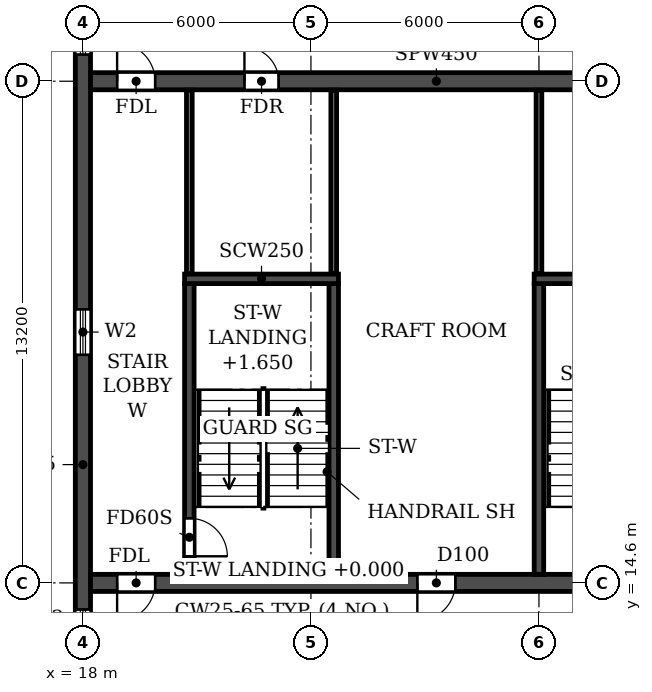
"""IFC4 building model, lengths in metres.
Left out: names, types, materials, properties, quantities, classifications, styles, units other than length and angle.
Written with IfcOpenShell. Run it as: python <this file> out.ifc"""

import sys

from ifc_helpers import new_model, si_unit, direction, frame, frame_2d, origin, place, context, subcontext, project, spatial, rectangle, extrude, element, fill, save


model = new_model("IFC4")
c1 = context("Model", 3, precision=1e-05, world=origin(), true_north=direction((0.0, 1.0)))
c2 = subcontext(c1, "Body", "Model", "MODEL_VIEW")
j1 = project(units=[si_unit("LENGTHUNIT", "METRE"), si_unit("PLANEANGLEUNIT", "RADIAN")], contexts=[c1])
p1 = place(None, origin())
s1 = spatial("IfcSite", under=j1, at=p1, CompositionType="ELEMENT")
p2 = place(p1, origin())
s2 = spatial("IfcBuilding", under=s1, at=p2, CompositionType="ELEMENT")
p3 = place(p2, frame((0.0, 0.0, 162.0)))
s3 = spatial("IfcBuildingStorey", under=s2, at=p3, CompositionType="ELEMENT", Elevation=162.0)
p4 = place(p3, frame((18.0, 4.683, 0.0), z_axis=(0.0, 0.0, 1.0), x_axis=(0.0, 1.0, 0.0)))
e1 = element("IfcWall", 1, at=p4, inside=s3, PredefinedType="SHEAR", context=c2, shape_type="SweptSolid", body=[
    extrude(rectangle(XDim=33.034, YDim=0.4, at=frame_2d((16.517, 0.0))), origin(), (0.0, 0.0, 1.0), 2.95),
])
p5 = place(p4, frame((23.817, 0.0, 0.9)))
e2 = element("IfcOpeningElement", 2, at=p5, cuts=e1, PredefinedType="OPENING", context=c2, shape_type="SweptSolid", body=[
    extrude(rectangle(XDim=1.2, YDim=1.5, at=frame_2d((0.6, 0.75))), frame((0.0, 0.21, 0.0), z_axis=(0.0, -1.0, 0.0), x_axis=(1.0, 0.0, 0.0)), (0.0, 0.0, 1.0), 0.42),
])
p6 = place(p4, frame((8.017, 0.0, 0.9)))
e3 = element("IfcOpeningElement", 3, at=p6, cuts=e1, PredefinedType="OPENING", context=c2, shape_type="SweptSolid", body=[
    extrude(rectangle(XDim=1.2, YDim=1.5, at=frame_2d((0.6, 0.75))), frame((0.0, 0.21, 0.0), z_axis=(0.0, -1.0, 0.0), x_axis=(1.0, 0.0, 0.0)), (0.0, 0.0, 1.0), 0.42),
])
p7 = place(p4, frame((28.293, 0.0, 0.6)))
e4 = element("IfcOpeningElement", 4, at=p7, cuts=e1, PredefinedType="OPENING", context=c2, shape_type="SweptSolid", body=[
    extrude(rectangle(XDim=2.2, YDim=1.8, at=frame_2d((1.1, 0.9))), frame((0.0, 0.21, 0.0), z_axis=(0.0, -1.0, 0.0), x_axis=(1.0, 0.0, 0.0)), (0.0, 0.0, 1.0), 0.42),
])
p8 = place(p4, frame((2.541, 0.0, 0.6)))
e5 = element("IfcOpeningElement", 5, at=p8, cuts=e1, PredefinedType="OPENING", context=c2, shape_type="SweptSolid", body=[
    extrude(rectangle(XDim=2.2, YDim=1.8, at=frame_2d((1.1, 0.9))), frame((0.0, 0.21, 0.0), z_axis=(0.0, -1.0, 0.0), x_axis=(1.0, 0.0, 0.0)), (0.0, 0.0, 1.0), 0.42),
])
p9 = place(p4, frame((15.917, 0.0, 0.9)))
e6 = element("IfcOpeningElement", 6, at=p9, cuts=e1, PredefinedType="OPENING", context=c2, shape_type="SweptSolid", body=[
    extrude(rectangle(XDim=1.2, YDim=1.5, at=frame_2d((0.6, 0.75))), frame((0.0, 0.21, 0.0), z_axis=(0.0, -1.0, 0.0), x_axis=(1.0, 0.0, 0.0)), (0.0, 0.0, 1.0), 0.42),
])
p10 = place(p3, frame((18.2, 14.6, 0.0), z_axis=(0.0, 0.0, 1.0), x_axis=(1.0, 0.0, 0.0)))
e7 = element("IfcWall", 7, at=p10, inside=s3, PredefinedType="SOLIDWALL", context=c2, shape_type="SweptSolid", body=[
    extrude(rectangle(XDim=65.6, YDim=0.45, at=frame_2d((32.8, 0.0))), origin(), (0.0, 0.0, 1.0), 2.95),
])
p11 = place(p10, frame((0.7, 0.0, 0.0)))
e8 = element("IfcOpeningElement", 8, at=p11, cuts=e7, PredefinedType="OPENING", context=c2, shape_type="SweptSolid", body=[
    extrude(rectangle(XDim=1.0, YDim=2.1, at=frame_2d((0.5, 1.05))), frame((0.0, 0.235, 0.0), z_axis=(0.0, -1.0, 0.0), x_axis=(1.0, 0.0, 0.0)), (0.0, 0.0, 1.0), 0.47),
])
p12 = place(p10, frame((8.6, 0.0, 0.0)))
e9 = element("IfcOpeningElement", 9, at=p12, cuts=e7, PredefinedType="OPENING", context=c2, shape_type="SweptSolid", body=[
    extrude(rectangle(XDim=1.0, YDim=2.1, at=frame_2d((0.5, 1.05))), frame((0.0, 0.235, 0.0), z_axis=(0.0, -1.0, 0.0), x_axis=(1.0, 0.0, 0.0)), (0.0, 0.0, 1.0), 0.47),
])
p13 = place(p10, frame((13.2, 0.0, 0.0)))
e10 = element("IfcOpeningElement", 10, at=p13, cuts=e7, PredefinedType="OPENING", context=c2, shape_type="SweptSolid", body=[
    extrude(rectangle(XDim=1.0, YDim=2.1, at=frame_2d((0.5, 1.05))), frame((0.0, 0.235, 0.0), z_axis=(0.0, -1.0, 0.0), x_axis=(1.0, 0.0, 0.0)), (0.0, 0.0, 1.0), 0.47),
])
p14 = place(p10, frame((27.1, 0.0, 0.0)))
e11 = element("IfcOpeningElement", 11, at=p14, cuts=e7, PredefinedType="OPENING", context=c2, shape_type="SweptSolid", body=[
    extrude(rectangle(XDim=1.0, YDim=2.1, at=frame_2d((0.5, 1.05))), frame((0.0, 0.235, 0.0), z_axis=(0.0, -1.0, 0.0), x_axis=(1.0, 0.0, 0.0)), (0.0, 0.0, 1.0), 0.47),
])
p15 = place(p10, frame((32.3, 0.0, 0.0)))
e12 = element("IfcOpeningElement", 12, at=p15, cuts=e7, PredefinedType="OPENING", context=c2, shape_type="SweptSolid", body=[
    extrude(rectangle(XDim=1.0, YDim=2.1, at=frame_2d((0.5, 1.05))), frame((0.0, 0.235, 0.0), z_axis=(0.0, -1.0, 0.0), x_axis=(1.0, 0.0, 0.0)), (0.0, 0.0, 1.0), 0.47),
])
p16 = place(p10, frame((35.95, 0.0, 0.0)))
e13 = element("IfcOpeningElement", 13, at=p16, cuts=e7, PredefinedType="OPENING", context=c2, shape_type="SweptSolid", body=[
    extrude(rectangle(XDim=1.5, YDim=2.1, at=frame_2d((0.75, 1.05))), frame((0.0, 0.235, 0.0), z_axis=(0.0, -1.0, 0.0), x_axis=(1.0, 0.0, 0.0)), (0.0, 0.0, 1.0), 0.47),
])
p17 = place(p10, frame((40.1, 0.0, 0.0)))
e14 = element("IfcOpeningElement", 14, at=p17, cuts=e7, PredefinedType="OPENING", context=c2, shape_type="SweptSolid", body=[
    extrude(rectangle(XDim=1.0, YDim=2.1, at=frame_2d((0.5, 1.05))), frame((0.0, 0.235, 0.0), z_axis=(0.0, -1.0, 0.0), x_axis=(1.0, 0.0, 0.0)), (0.0, 0.0, 1.0), 0.47),
])
p18 = place(p10, frame((51.4, 0.0, 0.0)))
e15 = element("IfcOpeningElement", 15, at=p18, cuts=e7, PredefinedType="OPENING", context=c2, shape_type="SweptSolid", body=[
    extrude(rectangle(XDim=1.0, YDim=2.1, at=frame_2d((0.5, 1.05))), frame((0.0, 0.235, 0.0), z_axis=(0.0, -1.0, 0.0), x_axis=(1.0, 0.0, 0.0)), (0.0, 0.0, 1.0), 0.47),
])
p19 = place(p10, frame((56.0, 0.0, 0.0)))
e16 = element("IfcOpeningElement", 16, at=p19, cuts=e7, PredefinedType="OPENING", context=c2, shape_type="SweptSolid", body=[
    extrude(rectangle(XDim=1.0, YDim=2.1, at=frame_2d((0.5, 1.05))), frame((0.0, 0.235, 0.0), z_axis=(0.0, -1.0, 0.0), x_axis=(1.0, 0.0, 0.0)), (0.0, 0.0, 1.0), 0.47),
])
p20 = place(p10, frame((63.9, 0.0, 0.0)))
e17 = element("IfcOpeningElement", 17, at=p20, cuts=e7, PredefinedType="OPENING", context=c2, shape_type="SweptSolid", body=[
    extrude(rectangle(XDim=1.0, YDim=2.1, at=frame_2d((0.5, 1.05))), frame((0.0, 0.235, 0.0), z_axis=(0.0, -1.0, 0.0), x_axis=(1.0, 0.0, 0.0)), (0.0, 0.0, 1.0), 0.47),
])
p21 = place(p3, frame((18.2, 27.8, 0.0), z_axis=(0.0, 0.0, 1.0), x_axis=(1.0, 0.0, 0.0)))
e18 = element("IfcWall", 18, at=p21, inside=s3, PredefinedType="SOLIDWALL", context=c2, shape_type="SweptSolid", body=[
    extrude(rectangle(XDim=65.6, YDim=0.45, at=frame_2d((32.8, 0.0))), origin(), (0.0, 0.0, 1.0), 2.95),
])
p22 = place(p21, frame((0.7, 0.0, 0.0)))
e19 = element("IfcOpeningElement", 19, at=p22, cuts=e18, PredefinedType="OPENING", context=c2, shape_type="SweptSolid", body=[
    extrude(rectangle(XDim=1.0, YDim=2.1, at=frame_2d((0.5, 1.05))), frame((0.0, 0.235, 0.0), z_axis=(0.0, -1.0, 0.0), x_axis=(1.0, 0.0, 0.0)), (0.0, 0.0, 1.0), 0.47),
])
p23 = place(p21, frame((4.05, 0.0, 0.0)))
e20 = element("IfcOpeningElement", 20, at=p23, cuts=e18, PredefinedType="OPENING", context=c2, shape_type="SweptSolid", body=[
    extrude(rectangle(XDim=0.9, YDim=2.1, at=frame_2d((0.45, 1.05))), frame((0.0, 0.235, 0.0), z_axis=(0.0, -1.0, 0.0), x_axis=(1.0, 0.0, 0.0)), (0.0, 0.0, 1.0), 0.47),
])
p24 = place(p21, frame((13.25, 0.0, 0.0)))
e21 = element("IfcOpeningElement", 21, at=p24, cuts=e18, PredefinedType="OPENING", context=c2, shape_type="SweptSolid", body=[
    extrude(rectangle(XDim=0.9, YDim=2.1, at=frame_2d((0.45, 1.05))), frame((0.0, 0.235, 0.0), z_axis=(0.0, -1.0, 0.0), x_axis=(1.0, 0.0, 0.0)), (0.0, 0.0, 1.0), 0.47),
])
p25 = place(p21, frame((17.7, 0.0, 0.0)))
e22 = element("IfcOpeningElement", 22, at=p25, cuts=e18, PredefinedType="OPENING", context=c2, shape_type="SweptSolid", body=[
    extrude(rectangle(XDim=1.0, YDim=2.1, at=frame_2d((0.5, 1.05))), frame((0.0, 0.235, 0.0), z_axis=(0.0, -1.0, 0.0), x_axis=(1.0, 0.0, 0.0)), (0.0, 0.0, 1.0), 0.47),
])
p26 = place(p21, frame((22.9, 0.0, 0.0)))
e23 = element("IfcOpeningElement", 23, at=p26, cuts=e18, PredefinedType="OPENING", context=c2, shape_type="SweptSolid", body=[
    extrude(rectangle(XDim=1.0, YDim=2.1, at=frame_2d((0.5, 1.05))), frame((0.0, 0.235, 0.0), z_axis=(0.0, -1.0, 0.0), x_axis=(1.0, 0.0, 0.0)), (0.0, 0.0, 1.0), 0.47),
])
p27 = place(p21, frame((29.4, 0.0, 0.0)))
e24 = element("IfcOpeningElement", 24, at=p27, cuts=e18, PredefinedType="OPENING", context=c2, shape_type="SweptSolid", body=[
    extrude(rectangle(XDim=1.0, YDim=2.1, at=frame_2d((0.5, 1.05))), frame((0.0, 0.235, 0.0), z_axis=(0.0, -1.0, 0.0), x_axis=(1.0, 0.0, 0.0)), (0.0, 0.0, 1.0), 0.47),
])
p28 = place(p21, frame((32.3, 0.0, 0.0)))
e25 = element("IfcOpeningElement", 25, at=p28, cuts=e18, PredefinedType="OPENING", context=c2, shape_type="SweptSolid", body=[
    extrude(rectangle(XDim=1.0, YDim=2.1, at=frame_2d((0.5, 1.05))), frame((0.0, 0.235, 0.0), z_axis=(0.0, -1.0, 0.0), x_axis=(1.0, 0.0, 0.0)), (0.0, 0.0, 1.0), 0.47),
])
p29 = place(p21, frame((36.25, 0.0, 0.0)))
e26 = element("IfcOpeningElement", 26, at=p29, cuts=e18, PredefinedType="OPENING", context=c2, shape_type="SweptSolid", body=[
    extrude(rectangle(XDim=1.5, YDim=2.1, at=frame_2d((0.75, 1.05))), frame((0.0, 0.235, 0.0), z_axis=(0.0, -1.0, 0.0), x_axis=(1.0, 0.0, 0.0)), (0.0, 0.0, 1.0), 0.47),
])
p30 = place(p21, frame((41.7, 0.0, 0.0)))
e27 = element("IfcOpeningElement", 27, at=p30, cuts=e18, PredefinedType="OPENING", context=c2, shape_type="SweptSolid", body=[
    extrude(rectangle(XDim=1.0, YDim=2.1, at=frame_2d((0.5, 1.05))), frame((0.0, 0.235, 0.0), z_axis=(0.0, -1.0, 0.0), x_axis=(1.0, 0.0, 0.0)), (0.0, 0.0, 1.0), 0.47),
])
p31 = place(p21, frame((46.9, 0.0, 0.0)))
e28 = element("IfcOpeningElement", 28, at=p31, cuts=e18, PredefinedType="OPENING", context=c2, shape_type="SweptSolid", body=[
    extrude(rectangle(XDim=1.0, YDim=2.1, at=frame_2d((0.5, 1.05))), frame((0.0, 0.235, 0.0), z_axis=(0.0, -1.0, 0.0), x_axis=(1.0, 0.0, 0.0)), (0.0, 0.0, 1.0), 0.47),
])
p32 = place(p21, frame((51.45, 0.0, 0.0)))
e29 = element("IfcOpeningElement", 29, at=p32, cuts=e18, PredefinedType="OPENING", context=c2, shape_type="SweptSolid", body=[
    extrude(rectangle(XDim=0.9, YDim=2.1, at=frame_2d((0.45, 1.05))), frame((0.0, 0.235, 0.0), z_axis=(0.0, -1.0, 0.0), x_axis=(1.0, 0.0, 0.0)), (0.0, 0.0, 1.0), 0.47),
])
p33 = place(p21, frame((60.65, 0.0, 0.0)))
e30 = element("IfcOpeningElement", 30, at=p33, cuts=e18, PredefinedType="OPENING", context=c2, shape_type="SweptSolid", body=[
    extrude(rectangle(XDim=0.9, YDim=2.1, at=frame_2d((0.45, 1.05))), frame((0.0, 0.235, 0.0), z_axis=(0.0, -1.0, 0.0), x_axis=(1.0, 0.0, 0.0)), (0.0, 0.0, 1.0), 0.47),
])
p34 = place(p21, frame((63.9, 0.0, 0.0)))
e31 = element("IfcOpeningElement", 31, at=p34, cuts=e18, PredefinedType="OPENING", context=c2, shape_type="SweptSolid", body=[
    extrude(rectangle(XDim=1.0, YDim=2.1, at=frame_2d((0.5, 1.05))), frame((0.0, 0.235, 0.0), z_axis=(0.0, -1.0, 0.0), x_axis=(1.0, 0.0, 0.0)), (0.0, 0.0, 1.0), 0.47),
])
p35 = place(p3, frame((30.0, 14.825, 0.0), z_axis=(0.0, 0.0, 1.0), x_axis=(0.0, 1.0, 0.0)))
e32 = element("IfcWall", 32, at=p35, inside=s3, PredefinedType="SOLIDWALL", context=c2, shape_type="SweptSolid", body=[
    extrude(rectangle(XDim=7.65, YDim=0.25, at=frame_2d((3.825, 0.0))), origin(), (0.0, 0.0, 1.0), 2.95),
])
p36 = place(p3, frame((29.875, 22.6, 0.0), z_axis=(0.0, 0.0, 1.0), x_axis=(1.0, 0.0, 0.0)))
e33 = element("IfcWall", 33, at=p36, inside=s3, PredefinedType="SOLIDWALL", context=c2, shape_type="SweptSolid", body=[
    extrude(rectangle(XDim=4.05, YDim=0.25, at=frame_2d((2.025, 0.0))), origin(), (0.0, 0.0, 1.0), 2.95),
])
p37 = place(p3, frame((20.8, 14.825, 0.0), z_axis=(0.0, 0.0, 1.0), x_axis=(0.0, 1.0, 0.0)))
e34 = element("IfcWall", 34, at=p37, inside=s3, PredefinedType="SOLIDWALL", context=c2, shape_type="SweptSolid", body=[
    extrude(rectangle(XDim=7.65, YDim=0.25, at=frame_2d((3.825, 0.0))), origin(), (0.0, 0.0, 1.0), 2.95),
])
p38 = place(p37, frame((0.475, 0.0, 0.0)))
e35 = element("IfcOpeningElement", 35, at=p38, cuts=e34, PredefinedType="OPENING", context=c2, shape_type="SweptSolid", body=[
    extrude(rectangle(XDim=1.0, YDim=2.1, at=frame_2d((0.5, 1.05))), frame((0.0, 0.135, 0.0), z_axis=(0.0, -1.0, 0.0), x_axis=(1.0, 0.0, 0.0)), (0.0, 0.0, 1.0), 0.27),
])
p39 = place(p3, frame((24.6, 14.825, 0.0), z_axis=(0.0, 0.0, 1.0), x_axis=(0.0, 1.0, 0.0)))
e36 = element("IfcWall", 36, at=p39, inside=s3, PredefinedType="SOLIDWALL", context=c2, shape_type="SweptSolid", body=[
    extrude(rectangle(XDim=7.65, YDim=0.25, at=frame_2d((3.825, 0.0))), origin(), (0.0, 0.0, 1.0), 2.95),
])
p40 = place(p3, frame((20.675, 22.6, 0.0), z_axis=(0.0, 0.0, 1.0), x_axis=(1.0, 0.0, 0.0)))
e37 = element("IfcWall", 37, at=p40, inside=s3, PredefinedType="SOLIDWALL", context=c2, shape_type="SweptSolid", body=[
    extrude(rectangle(XDim=4.05, YDim=0.25, at=frame_2d((2.025, 0.0))), origin(), (0.0, 0.0, 1.0), 2.95),
])
for number, where, z_axis, x_axis in (
    (38, (20.8, 22.735, 0.0), (0.0, 0.0, 1.0), (0.0, 1.0, 0.0)),
    (39, (24.6, 22.735, 0.0), (0.0, 0.0, 1.0), (0.0, 1.0, 0.0)),
    (40, (30.0, 22.735, 0.0), (0.0, 0.0, 1.0), (0.0, 1.0, 0.0)),
):
    element("IfcWall", number, at=place(p3, frame(where, z_axis=z_axis, x_axis=x_axis)), inside=s3, PredefinedType="PARTITIONING", context=c2, shape_type="SweptSolid", body=[
        extrude(rectangle(XDim=4.83, YDim=0.15, at=frame_2d((2.415, 0.0))), origin(), (0.0, 0.0, 1.0), 2.95),
    ])
p41 = place(p5, origin())
e41 = element("IfcWindow", 41, at=p41, inside=s3, PartitioningType="SINGLE_PANEL", PredefinedType="WINDOW", context=c2, shape_type="SweptSolid", body=[
    extrude(rectangle(XDim=1.2, YDim=1.5, at=frame_2d((0.6, 0.75))), frame((0.0, 0.03, 0.0), z_axis=(0.0, -1.0, 0.0), x_axis=(1.0, 0.0, 0.0)), (0.0, 0.0, 1.0), 0.06),
])
fill(e2, e41)
p42 = place(p6, origin())
e42 = element("IfcWindow", 42, at=p42, inside=s3, PartitioningType="SINGLE_PANEL", PredefinedType="WINDOW", context=c2, shape_type="SweptSolid", body=[
    extrude(rectangle(XDim=1.2, YDim=1.5, at=frame_2d((0.6, 0.75))), frame((0.0, 0.03, 0.0), z_axis=(0.0, -1.0, 0.0), x_axis=(1.0, 0.0, 0.0)), (0.0, 0.0, 1.0), 0.06),
])
fill(e3, e42)
p43 = place(p9, origin())
e43 = element("IfcWindow", 43, at=p43, inside=s3, PartitioningType="SINGLE_PANEL", PredefinedType="WINDOW", context=c2, shape_type="SweptSolid", body=[
    extrude(rectangle(XDim=1.2, YDim=1.5, at=frame_2d((0.6, 0.75))), frame((0.0, 0.03, 0.0), z_axis=(0.0, -1.0, 0.0), x_axis=(1.0, 0.0, 0.0)), (0.0, 0.0, 1.0), 0.06),
])
fill(e6, e43)
p44 = place(p22, origin())
e44 = element("IfcDoor", 44, at=p44, inside=s3, OperationType="SINGLE_SWING_LEFT", PredefinedType="DOOR", context=c2, shape_type="SweptSolid", body=[
    extrude(rectangle(XDim=1.0, YDim=2.1, at=frame_2d((0.5, 1.05))), frame((0.0, 0.025, 0.0), z_axis=(0.0, -1.0, 0.0), x_axis=(1.0, 0.0, 0.0)), (0.0, 0.0, 1.0), 0.05),
])
fill(e19, e44)
p45 = place(p23, origin())
e45 = element("IfcDoor", 45, at=p45, inside=s3, OperationType="SINGLE_SWING_LEFT", PredefinedType="DOOR", context=c2, shape_type="SweptSolid", body=[
    extrude(rectangle(XDim=0.9, YDim=2.1, at=frame_2d((0.45, 1.05))), frame((0.0, 0.025, 0.0), z_axis=(0.0, -1.0, 0.0), x_axis=(1.0, 0.0, 0.0)), (0.0, 0.0, 1.0), 0.05),
])
fill(e20, e45)
p46 = place(p11, frame((1.0, 0.0, 0.0), z_axis=(0.0, 0.0, 1.0), x_axis=(-1.0, 0.0, 0.0)))
e46 = element("IfcDoor", 46, at=p46, inside=s3, OperationType="SINGLE_SWING_RIGHT", PredefinedType="DOOR", context=c2, shape_type="SweptSolid", body=[
    extrude(rectangle(XDim=1.0, YDim=2.1, at=frame_2d((0.5, 1.05))), frame((0.0, 0.025, 0.0), z_axis=(0.0, -1.0, 0.0), x_axis=(1.0, 0.0, 0.0)), (0.0, 0.0, 1.0), 0.05),
])
fill(e8, e46)
p47 = place(p12, frame((1.0, 0.0, 0.0), z_axis=(0.0, 0.0, 1.0), x_axis=(-1.0, 0.0, 0.0)))
e47 = element("IfcDoor", 47, at=p47, inside=s3, OperationType="SINGLE_SWING_RIGHT", PredefinedType="DOOR", context=c2, shape_type="SweptSolid", body=[
    extrude(rectangle(XDim=1.0, YDim=2.1, at=frame_2d((0.5, 1.05))), frame((0.0, 0.025, 0.0), z_axis=(0.0, -1.0, 0.0), x_axis=(1.0, 0.0, 0.0)), (0.0, 0.0, 1.0), 0.05),
])
fill(e9, e47)
p48 = place(p38, frame((1.0, 0.0, 0.0), z_axis=(0.0, 0.0, 1.0), x_axis=(-1.0, 0.0, 0.0)))
e48 = element("IfcDoor", 48, at=p48, inside=s3, OperationType="SINGLE_SWING_RIGHT", PredefinedType="DOOR", context=c2, shape_type="SweptSolid", body=[
    extrude(rectangle(XDim=1.0, YDim=2.1, at=frame_2d((0.5, 1.05))), frame((0.0, 0.025, 0.0), z_axis=(0.0, -1.0, 0.0), x_axis=(1.0, 0.0, 0.0)), (0.0, 0.0, 1.0), 0.05),
])
fill(e35, e48)
save(model, sys.argv[1])
